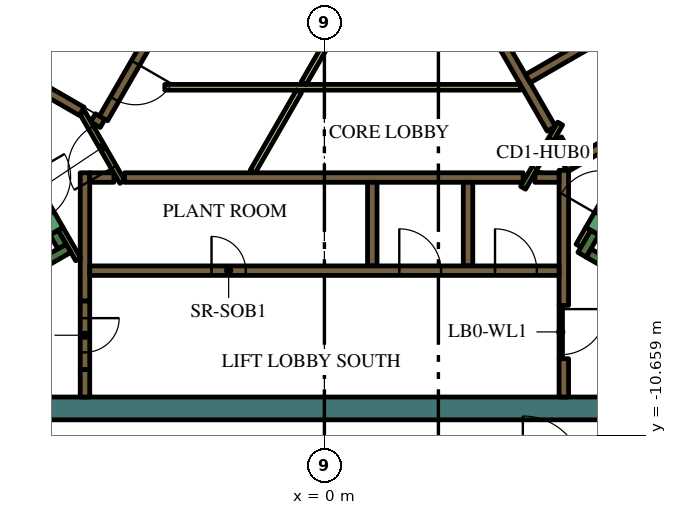
"""IFC4 building model, lengths in metres.
Left out: names, types, materials, properties, quantities, classifications, styles, units other than length and angle.
Written with IfcOpenShell. Run it as: python <this file> out.ifc"""

import sys

from ifc_helpers import new_model, si_unit, direction, frame, frame_2d, origin, place, context, subcontext, project, spatial, rectangle, extrude, element, fill, save


model = new_model("IFC4")
c1 = context("Model", 3, precision=1e-05, world=origin(), true_north=direction((0.0, 1.0)))
c2 = subcontext(c1, "Body", "Model", "MODEL_VIEW")
j1 = project(units=[si_unit("LENGTHUNIT", "METRE"), si_unit("PLANEANGLEUNIT", "RADIAN")], contexts=[c1])
p1 = place(None, origin())
s1 = spatial("IfcSite", under=j1, at=p1, CompositionType="ELEMENT")
p2 = place(p1, origin())
s2 = spatial("IfcBuilding", under=s1, at=p2, CompositionType="ELEMENT")
p3 = place(p2, frame((0.0, 0.0, 331.8)))
s3 = spatial("IfcBuildingStorey", under=s2, at=p3, CompositionType="ELEMENT", Elevation=331.8)
p4 = place(p3, frame((8.904, -9.95, 0.0), z_axis=(0.0, 0.0, 1.0), x_axis=(-1.0, 0.0, 0.0)))
e1 = element("IfcWall", 1, at=p4, inside=s3, PredefinedType="SOLIDWALL", context=c2, shape_type="SweptSolid", body=[
    extrude(rectangle(XDim=22.161, YDim=0.6, at=frame_2d((11.081, 0.0))), origin(), (0.0, 0.0, 1.0), 4.2),
])
p5 = place(p3, frame((-4.652, 11.842, 0.0), z_axis=(0.0, 0.0, 1.0), x_axis=(-0.500003640647, -0.866023301845, 0.0)))
e2 = element("IfcWall", 2, at=p5, inside=s3, PredefinedType="SOLIDWALL", context=c2, shape_type="SweptSolid", body=[
    extrude(rectangle(XDim=15.858, YDim=0.6, at=frame_2d((7.929, 0.0))), origin(), (0.0, 0.0, 1.0), 4.2),
])
p6 = place(p3, frame((12.84, -9.261, 0.0), z_axis=(0.0, 0.0, 1.0), x_axis=(-0.866013990052, 0.500019768644, 0.0)))
e3 = element("IfcWall", 3, at=p6, inside=s3, PredefinedType="SOLIDWALL", context=c2, shape_type="SweptSolid", body=[
    extrude(rectangle(XDim=6.8, YDim=0.25, at=frame_2d((3.4, 0.0))), origin(), (0.0, 0.0, 1.0), 4.2),
])
p7 = place(p3, frame((6.78, -5.906, 0.0), z_axis=(0.0, 0.0, 1.0), x_axis=(0.500223362819, 0.865896406789, 0.0)))
e4 = element("IfcWall", 4, at=p7, inside=s3, PredefinedType="SOLIDWALL", context=c2, shape_type="SweptSolid", body=[
    extrude(rectangle(XDim=0.675, YDim=0.25, at=frame_2d((0.337, 0.0))), origin(), (0.0, 0.0, 1.0), 4.2),
])
p8 = place(p3, frame((-12.84, -9.261, 0.0), z_axis=(0.0, 0.0, 1.0), x_axis=(0.866016039709, 0.500016218704, 0.0)))
e5 = element("IfcWall", 5, at=p8, inside=s3, PredefinedType="SOLIDWALL", context=c2, shape_type="SweptSolid", body=[
    extrude(rectangle(XDim=7.05, YDim=0.25, at=frame_2d((3.525, 0.0))), origin(), (0.0, 0.0, 1.0), 4.2),
])
p9 = place(p3, frame((-6.905, -5.69, 0.0), z_axis=(0.0, 0.0, 1.0), x_axis=(-0.500402024738, 0.865793170242, 0.0)))
e6 = element("IfcWall", 6, at=p9, inside=s3, PredefinedType="SOLIDWALL", context=c2, shape_type="SweptSolid", body=[
    extrude(rectangle(XDim=0.425, YDim=0.25, at=frame_2d((0.212, 0.0))), origin(), (0.0, 0.0, 1.0), 4.2),
])
p10 = place(p3, frame((6.3, -7.24, 0.0), z_axis=(0.0, 0.0, 1.0), x_axis=(0.0, 1.0, 0.0)))
e7 = element("IfcWall", 7, at=p10, inside=s3, PredefinedType="SOLIDWALL", context=c2, shape_type="SweptSolid", body=[
    extrude(rectangle(XDim=3.556, YDim=0.25, at=frame_2d((1.778, 0.0))), origin(), (0.0, 0.0, 1.0), 4.2),
])
p11 = place(p3, frame((6.3, -9.65, 0.0), z_axis=(0.0, 0.0, 1.0), x_axis=(0.0, 1.0, 0.0)))
e8 = element("IfcWall", 8, at=p11, inside=s3, PredefinedType="SOLIDWALL", context=c2, shape_type="SweptSolid", body=[
    extrude(rectangle(XDim=1.008, YDim=0.25, at=frame_2d((0.504, 0.0))), origin(), (0.0, 0.0, 1.0), 4.2),
])
p12 = place(p3, frame((5.538, -3.875, 0.0), z_axis=(0.0, 0.0, 1.0), x_axis=(1.0, 0.0, 0.0)))
e9 = element("IfcWall", 9, at=p12, inside=s3, PredefinedType="SOLIDWALL", context=c2, shape_type="SweptSolid", body=[
    extrude(rectangle(XDim=0.637, YDim=0.25, at=frame_2d((0.318, 0.0))), origin(), (0.0, 0.0, 1.0), 4.2),
])
p13 = place(p3, frame((-5.259, -3.875, 0.0), z_axis=(0.0, 0.0, 1.0), x_axis=(1.0, 0.0, 0.0)))
e10 = element("IfcWall", 10, at=p13, inside=s3, PredefinedType="SOLIDWALL", context=c2, shape_type="SweptSolid", body=[
    extrude(rectangle(XDim=10.489, YDim=0.25, at=frame_2d((5.244, 0.0))), origin(), (0.0, 0.0, 1.0), 4.2),
])
for number, where, z_axis, x_axis in (
    (11, (1.26, -4.0, 0.0), (0.0, 0.0, 1.0), (0.0, -1.0, 0.0)),
    (12, (3.78, -4.0, 0.0), (0.0, 0.0, 1.0), (0.0, -1.0, 0.0)),
):
    element("IfcWall", number, at=place(p3, frame(where, z_axis=z_axis, x_axis=x_axis)), inside=s3, PredefinedType="SOLIDWALL", context=c2, shape_type="SweptSolid", body=[
        extrude(rectangle(XDim=2.2, YDim=0.25, at=frame_2d((1.1, 0.0))), origin(), (0.0, 0.0, 1.0), 4.2),
    ])
p14 = place(p3, frame((-6.3, -7.125, 0.0), z_axis=(0.0, 0.0, 1.0), x_axis=(0.0, 1.0, 0.0)))
e13 = element("IfcWall", 13, at=p14, inside=s3, PredefinedType="SOLIDWALL", context=c2, shape_type="SweptSolid", body=[
    extrude(rectangle(XDim=3.375, YDim=0.25, at=frame_2d((1.687, 0.0))), origin(), (0.0, 0.0, 1.0), 4.2),
])
p15 = place(p3, frame((-6.175, -3.875, 0.0), z_axis=(0.0, 0.0, 1.0), x_axis=(1.0, 0.0, 0.0)))
e14 = element("IfcWall", 14, at=p15, inside=s3, PredefinedType="SOLIDWALL", context=c2, shape_type="SweptSolid", body=[
    extrude(rectangle(XDim=0.637, YDim=0.25, at=frame_2d((0.318, 0.0))), origin(), (0.0, 0.0, 1.0), 4.2),
])
p16 = place(p3, frame((-6.3, -8.925, 0.0), z_axis=(0.0, 0.0, 1.0), x_axis=(0.0, -1.0, 0.0)))
e15 = element("IfcWall", 15, at=p16, inside=s3, PredefinedType="SOLIDWALL", context=c2, shape_type="SweptSolid", body=[
    extrude(rectangle(XDim=0.725, YDim=0.25, at=frame_2d((0.363, 0.0))), origin(), (0.0, 0.0, 1.0), 4.2),
])
p17 = place(p3, frame((8.61, -2.303, 0.0), z_axis=(0.0, 0.0, 1.0), x_axis=(-0.866056864386, -0.49994550468, 0.0)))
e16 = element("IfcWall", 16, at=p17, inside=s3, PredefinedType="SOLIDWALL", context=c2, shape_type="SweptSolid", body=[
    extrude(rectangle(XDim=2.621, YDim=0.25, at=frame_2d((1.311, 0.0))), origin(), (0.0, 0.0, 1.0), 4.2),
])
p18 = place(p3, frame((6.13, -2.867, 0.0), z_axis=(0.0, 0.0, 1.0), x_axis=(0.500160776593, -0.865932559475, 0.0)))
e17 = element("IfcWall", 17, at=p18, inside=s3, PredefinedType="SOLIDWALL", context=c2, shape_type="SweptSolid", body=[
    extrude(rectangle(XDim=0.627, YDim=0.25, at=frame_2d((0.313, 0.0))), origin(), (0.0, 0.0, 1.0), 4.2),
])
p19 = place(p3, frame((5.97, -2.591, 0.0), z_axis=(0.0, 0.0, 1.0), x_axis=(-0.499994469932, 0.866028596547, 0.0)))
e18 = element("IfcWall", 18, at=p19, inside=s3, PredefinedType="SOLIDWALL", context=c2, shape_type="SweptSolid", body=[
    extrude(rectangle(XDim=10.488, YDim=0.25, at=frame_2d((5.244, 0.0))), origin(), (0.0, 0.0, 1.0), 4.2),
])
p20 = place(p3, frame((5.354, -1.274, 0.0), z_axis=(0.0, 0.0, 1.0), x_axis=(0.866008176907, 0.50002983664, 0.0)))
e19 = element("IfcWall", 19, at=p20, inside=s3, PredefinedType="SOLIDWALL", context=c2, shape_type="SweptSolid", body=[
    extrude(rectangle(XDim=2.2, YDim=0.25, at=frame_2d((1.1, 0.0))), origin(), (0.0, 0.0, 1.0), 4.2),
])
p21 = place(p3, frame((-8.06, -1.311, 0.0), z_axis=(0.0, 0.0, 1.0), x_axis=(0.50000273126, 0.866023826885, 0.0)))
e20 = element("IfcWall", 20, at=p21, inside=s3, PredefinedType="SOLIDWALL", context=c2, shape_type="SweptSolid", body=[
    extrude(rectangle(XDim=10.33, YDim=0.25, at=frame_2d((5.165, 0.0))), origin(), (0.0, 0.0, 1.0), 4.2),
])
p22 = place(p3, frame((-6.088, -2.305, 0.0), z_axis=(0.0, 0.0, 1.0), x_axis=(0.866059450854, -0.499941024108, 0.0)))
e21 = element("IfcWall", 21, at=p22, inside=s3, PredefinedType="SOLIDWALL", context=c2, shape_type="SweptSolid", body=[
    extrude(rectangle(XDim=0.29, YDim=0.25, at=frame_2d((0.145, 0.0))), origin(), (0.0, 0.0, 1.0), 4.2),
])
p23 = place(p3, frame((-7.889, -1.265, 0.0), z_axis=(0.0, 0.0, 1.0), x_axis=(0.865986741702, -0.500066958712, 0.0)))
e22 = element("IfcWall", 22, at=p23, inside=s3, PredefinedType="SOLIDWALL", context=c2, shape_type="SweptSolid", body=[
    extrude(rectangle(XDim=1.738, YDim=0.25, at=frame_2d((0.869, 0.0))), origin(), (0.0, 0.0, 1.0), 4.2),
])
p24 = place(p3, frame((-6.48, -6.027, 0.0), z_axis=(0.0, 0.0, 1.0), x_axis=(-0.499927229454, 0.866067413802, 0.0)))
e23 = element("IfcWall", 23, at=p24, inside=s3, PredefinedType="PARTITIONING", context=c2, shape_type="SweptSolid", body=[
    extrude(rectangle(XDim=0.929, YDim=0.15, at=frame_2d((0.464, 0.0))), origin(), (0.0, 0.0, 1.0), 4.2),
])
p25 = place(p3, frame((6.945, -5.222, 0.0), z_axis=(0.0, 0.0, 1.0), x_axis=(-0.499818422106, -0.866130212453, 0.0)))
e24 = element("IfcWall", 24, at=p25, inside=s3, PredefinedType="PARTITIONING", context=c2, shape_type="SweptSolid", body=[
    extrude(rectangle(XDim=0.514, YDim=0.15, at=frame_2d((0.257, 0.0))), origin(), (0.0, 0.0, 1.0), 3.45),
])
p26 = place(p3, frame((-4.2, -1.5, 0.0), z_axis=(0.0, 0.0, 1.0), x_axis=(1.0, 0.0, 0.0)))
e25 = element("IfcWall", 25, at=p26, inside=s3, PredefinedType="PARTITIONING", context=c2, shape_type="SweptSolid", body=[
    extrude(rectangle(XDim=9.359, YDim=0.15, at=frame_2d((4.68, 0.0))), origin(), (0.0, 0.0, 1.0), 3.45),
])
p27 = place(p3, frame((-0.544, -1.393, 0.0), z_axis=(0.0, 0.0, 1.0), x_axis=(0.499928740635, 0.866066541489, 0.0)))
e26 = element("IfcWall", 26, at=p27, inside=s3, PredefinedType="PARTITIONING", context=c2, shape_type="SweptSolid", body=[
    extrude(rectangle(XDim=1.912, YDim=0.15, at=frame_2d((0.956, 0.0))), origin(), (0.0, 0.0, 1.0), 3.45),
])
p28 = place(p3, frame((-0.668, -1.607, 0.0), z_axis=(0.0, 0.0, 1.0), x_axis=(-0.50003736129, -0.866003832159, 0.0)))
e27 = element("IfcWall", 27, at=p28, inside=s3, PredefinedType="PARTITIONING", context=c2, shape_type="SweptSolid", body=[
    extrude(rectangle(XDim=2.438, YDim=0.15, at=frame_2d((1.219, 0.0))), origin(), (0.0, 0.0, 1.0), 3.45),
])
p29 = place(p3, frame((-6.175, -6.325, 0.0), z_axis=(0.0, 0.0, 1.0), x_axis=(1.0, 0.0, 0.0)))
e28 = element("IfcWall", 28, at=p29, inside=s3, PredefinedType="SOLIDWALL", context=c2, shape_type="SweptSolid", body=[
    extrude(rectangle(XDim=12.35, YDim=0.25, at=frame_2d((6.175, 0.0))), origin(), (0.0, 0.0, 1.0), 4.2),
])
p30 = place(p29, frame((3.205, 0.0, 0.0)))
e29 = element("IfcOpeningElement", 29, at=p30, cuts=e28, PredefinedType="OPENING", context=c2, shape_type="SweptSolid", body=[
    extrude(rectangle(XDim=0.9, YDim=2.1, at=frame_2d((0.45, 1.05))), frame((0.0, 0.135, 0.0), z_axis=(0.0, -1.0, 0.0), x_axis=(1.0, 0.0, 0.0)), (0.0, 0.0, 1.0), 0.27),
])
p31 = place(p29, frame((8.145, 0.0, 0.0)))
e30 = element("IfcOpeningElement", 30, at=p31, cuts=e28, PredefinedType="OPENING", context=c2, shape_type="SweptSolid", body=[
    extrude(rectangle(XDim=1.1, YDim=2.1, at=frame_2d((0.55, 1.05))), frame((0.0, 0.135, 0.0), z_axis=(0.0, -1.0, 0.0), x_axis=(1.0, 0.0, 0.0)), (0.0, 0.0, 1.0), 0.27),
])
p32 = place(p29, frame((10.665, 0.0, 0.0)))
e31 = element("IfcOpeningElement", 31, at=p32, cuts=e28, PredefinedType="OPENING", context=c2, shape_type="SweptSolid", body=[
    extrude(rectangle(XDim=1.1, YDim=2.1, at=frame_2d((0.55, 1.05))), frame((0.0, 0.135, 0.0), z_axis=(0.0, -1.0, 0.0), x_axis=(1.0, 0.0, 0.0)), (0.0, 0.0, 1.0), 0.27),
])
p33 = place(p3, frame((8.565, -2.185, 0.0), z_axis=(0.0, 0.0, 1.0), x_axis=(-0.499997954832, 0.866026584559, 0.0)))
e32 = element("IfcWall", 32, at=p33, inside=s3, PredefinedType="SOLIDWALL", context=c2, shape_type="SweptSolid", body=[
    extrude(rectangle(XDim=12.35, YDim=0.25, at=frame_2d((6.175, 0.0))), origin(), (0.0, 0.0, 1.0), 4.2),
])
p34 = place(p33, frame((0.685, 0.0, 0.0)))
e33 = element("IfcOpeningElement", 33, at=p34, cuts=e32, PredefinedType="OPENING", context=c2, shape_type="SweptSolid", body=[
    extrude(rectangle(XDim=0.9, YDim=2.1, at=frame_2d((0.45, 1.05))), frame((0.0, 0.135, 0.0), z_axis=(0.0, -1.0, 0.0), x_axis=(1.0, 0.0, 0.0)), (0.0, 0.0, 1.0), 0.27),
])
p35 = place(p33, frame((3.105, 0.0, 0.0)))
e34 = element("IfcOpeningElement", 34, at=p35, cuts=e32, PredefinedType="OPENING", context=c2, shape_type="SweptSolid", body=[
    extrude(rectangle(XDim=1.1, YDim=2.1, at=frame_2d((0.55, 1.05))), frame((0.0, 0.135, 0.0), z_axis=(0.0, -1.0, 0.0), x_axis=(1.0, 0.0, 0.0)), (0.0, 0.0, 1.0), 0.27),
])
p36 = place(p33, frame((5.625, 0.0, 0.0)))
e35 = element("IfcOpeningElement", 35, at=p36, cuts=e32, PredefinedType="OPENING", context=c2, shape_type="SweptSolid", body=[
    extrude(rectangle(XDim=1.1, YDim=2.1, at=frame_2d((0.55, 1.05))), frame((0.0, 0.135, 0.0), z_axis=(0.0, -1.0, 0.0), x_axis=(1.0, 0.0, 0.0)), (0.0, 0.0, 1.0), 0.27),
])
p37 = place(p33, frame((8.145, 0.0, 0.0)))
e36 = element("IfcOpeningElement", 36, at=p37, cuts=e32, PredefinedType="OPENING", context=c2, shape_type="SweptSolid", body=[
    extrude(rectangle(XDim=1.1, YDim=2.1, at=frame_2d((0.55, 1.05))), frame((0.0, 0.135, 0.0), z_axis=(0.0, -1.0, 0.0), x_axis=(1.0, 0.0, 0.0)), (0.0, 0.0, 1.0), 0.27),
])
p38 = place(p33, frame((10.665, 0.0, 0.0)))
e37 = element("IfcOpeningElement", 37, at=p38, cuts=e32, PredefinedType="OPENING", context=c2, shape_type="SweptSolid", body=[
    extrude(rectangle(XDim=1.1, YDim=2.1, at=frame_2d((0.55, 1.05))), frame((0.0, 0.135, 0.0), z_axis=(0.0, -1.0, 0.0), x_axis=(1.0, 0.0, 0.0)), (0.0, 0.0, 1.0), 0.27),
])
p39 = place(p3, frame((-0.898, 6.194, 0.0), z_axis=(0.0, 0.0, 1.0), x_axis=(-0.499996202215, -0.866027596426, 0.0)))
e38 = element("IfcWall", 38, at=p39, inside=s3, PredefinedType="SOLIDWALL", context=c2, shape_type="SweptSolid", body=[
    extrude(rectangle(XDim=9.83, YDim=0.25, at=frame_2d((4.915, 0.0))), origin(), (0.0, 0.0, 1.0), 4.2),
])
p40 = place(p39, frame((0.585, 0.0, 0.0)))
e39 = element("IfcOpeningElement", 39, at=p40, cuts=e38, PredefinedType="OPENING", context=c2, shape_type="SweptSolid", body=[
    extrude(rectangle(XDim=1.1, YDim=2.1, at=frame_2d((0.55, 1.05))), frame((0.0, 0.135, 0.0), z_axis=(0.0, -1.0, 0.0), x_axis=(1.0, 0.0, 0.0)), (0.0, 0.0, 1.0), 0.27),
])
p41 = place(p39, frame((3.105, 0.0, 0.0)))
e40 = element("IfcOpeningElement", 40, at=p41, cuts=e38, PredefinedType="OPENING", context=c2, shape_type="SweptSolid", body=[
    extrude(rectangle(XDim=1.1, YDim=2.1, at=frame_2d((0.55, 1.05))), frame((0.0, 0.135, 0.0), z_axis=(0.0, -1.0, 0.0), x_axis=(1.0, 0.0, 0.0)), (0.0, 0.0, 1.0), 0.27),
])
p42 = place(p39, frame((5.625, 0.0, 0.0)))
e41 = element("IfcOpeningElement", 41, at=p42, cuts=e38, PredefinedType="OPENING", context=c2, shape_type="SweptSolid", body=[
    extrude(rectangle(XDim=1.1, YDim=2.1, at=frame_2d((0.55, 1.05))), frame((0.0, 0.135, 0.0), z_axis=(0.0, -1.0, 0.0), x_axis=(1.0, 0.0, 0.0)), (0.0, 0.0, 1.0), 0.27),
])
p43 = place(p39, frame((8.145, 0.0, 0.0)))
e42 = element("IfcOpeningElement", 42, at=p43, cuts=e38, PredefinedType="OPENING", context=c2, shape_type="SweptSolid", body=[
    extrude(rectangle(XDim=1.1, YDim=2.1, at=frame_2d((0.55, 1.05))), frame((0.0, 0.135, 0.0), z_axis=(0.0, -1.0, 0.0), x_axis=(1.0, 0.0, 0.0)), (0.0, 0.0, 1.0), 0.27),
])
p44 = place(p3, frame((7.053, -5.284, 0.0), z_axis=(0.0, 0.0, 1.0), x_axis=(0.500078061341, 0.865980330357, 0.0)))
e43 = element("IfcWall", 43, at=p44, inside=s3, PredefinedType="SOLIDWALL", context=c2, shape_type="SweptSolid", body=[
    extrude(rectangle(XDim=2.1, YDim=0.4, at=frame_2d((1.05, 0.0))), origin(), (0.0, 0.0, 1.0), 4.2),
])
p45 = place(p44, frame((0.45, 0.0, 0.0)))
e44 = element("IfcOpeningElement", 44, at=p45, cuts=e43, PredefinedType="OPENING", context=c2, shape_type="SweptSolid", body=[
    extrude(rectangle(XDim=1.2, YDim=2.1, at=frame_2d((0.6, 1.05))), frame((0.0, 0.21, 0.0), z_axis=(0.0, -1.0, 0.0), x_axis=(1.0, 0.0, 0.0)), (0.0, 0.0, 1.0), 0.42),
])
p46 = place(p3, frame((-8.103, -3.466, 0.0), z_axis=(0.0, 0.0, 1.0), x_axis=(0.500078061341, -0.865980330357, 0.0)))
e45 = element("IfcWall", 45, at=p46, inside=s3, PredefinedType="SOLIDWALL", context=c2, shape_type="SweptSolid", body=[
    extrude(rectangle(XDim=2.1, YDim=0.4, at=frame_2d((1.05, 0.0))), origin(), (0.0, 0.0, 1.0), 4.2),
])
p47 = place(p46, frame((0.45, 0.0, 0.0)))
e46 = element("IfcOpeningElement", 46, at=p47, cuts=e45, PredefinedType="OPENING", context=c2, shape_type="SweptSolid", body=[
    extrude(rectangle(XDim=1.2, YDim=2.1, at=frame_2d((0.6, 1.05))), frame((0.0, 0.21, 0.0), z_axis=(0.0, -1.0, 0.0), x_axis=(1.0, 0.0, 0.0)), (0.0, 0.0, 1.0), 0.42),
])
p48 = place(p3, frame((-6.3, -7.125, 0.0), z_axis=(0.0, 0.0, 1.0), x_axis=(0.0, -1.0, 0.0)))
e47 = element("IfcWall", 47, at=p48, inside=s3, PredefinedType="SOLIDWALL", context=c2, shape_type="SweptSolid", body=[
    extrude(rectangle(XDim=1.8, YDim=0.25, at=frame_2d((0.9, 0.0))), origin(), (0.0, 0.0, 1.0), 4.2),
])
p49 = place(p48, frame((0.45, 0.0, 0.0)))
e48 = element("IfcOpeningElement", 48, at=p49, cuts=e47, PredefinedType="OPENING", context=c2, shape_type="SweptSolid", body=[
    extrude(rectangle(XDim=0.9, YDim=2.1, at=frame_2d((0.45, 1.05))), frame((0.0, 0.135, 0.0), z_axis=(0.0, -1.0, 0.0), x_axis=(1.0, 0.0, 0.0)), (0.0, 0.0, 1.0), 0.27),
])
p50 = place(p3, frame((6.203, -2.456, 0.0), z_axis=(0.0, 0.0, 1.0), x_axis=(-0.500043961785, -0.866000020948, 0.0)))
e49 = element("IfcWall", 49, at=p50, inside=s3, PredefinedType="PARTITIONING", context=c2, shape_type="SweptSolid", body=[
    extrude(rectangle(XDim=1.95, YDim=0.15, at=frame_2d((0.975, 0.0))), origin(), (0.0, 0.0, 1.0), 4.2),
])
p51 = place(p50, frame((0.45, 0.0, 0.0)))
e50 = element("IfcOpeningElement", 50, at=p51, cuts=e49, PredefinedType="OPENING", context=c2, shape_type="SweptSolid", body=[
    extrude(rectangle(XDim=0.9, YDim=2.1, at=frame_2d((0.45, 1.05))), frame((0.0, 0.085, 0.0), z_axis=(0.0, -1.0, 0.0), x_axis=(1.0, 0.0, 0.0)), (0.0, 0.0, 1.0), 0.17),
])
p52 = place(p3, frame((-5.317, -3.99, 0.0), z_axis=(0.0, 0.0, 1.0), x_axis=(-0.500027713859, 0.866009402589, 0.0)))
e51 = element("IfcWall", 51, at=p52, inside=s3, PredefinedType="PARTITIONING", context=c2, shape_type="SweptSolid", body=[
    extrude(rectangle(XDim=2.1, YDim=0.15, at=frame_2d((1.05, 0.0))), origin(), (0.0, 0.0, 1.0), 4.2),
])
p53 = place(p52, frame((0.45, 0.0, 0.0)))
e52 = element("IfcOpeningElement", 52, at=p53, cuts=e51, PredefinedType="OPENING", context=c2, shape_type="SweptSolid", body=[
    extrude(rectangle(XDim=1.2, YDim=2.1, at=frame_2d((0.6, 1.05))), frame((0.0, 0.085, 0.0), z_axis=(0.0, -1.0, 0.0), x_axis=(1.0, 0.0, 0.0)), (0.0, 0.0, 1.0), 0.17),
])
p54 = place(p3, frame((6.22, -7.237, 0.0), z_axis=(0.0, 0.0, 1.0), x_axis=(0.0, -1.0, 0.0)))
e53 = element("IfcWall", 53, at=p54, inside=s3, PredefinedType="PARTITIONING", context=c2, shape_type="SweptSolid", body=[
    extrude(rectangle(XDim=1.4, YDim=0.09, at=frame_2d((0.7, 0.0))), origin(), (0.0, 0.0, 1.0), 3.45),
])
p55 = place(p54, frame((0.1, 0.0, 0.0)))
e54 = element("IfcOpeningElement", 54, at=p55, cuts=e53, PredefinedType="OPENING", context=c2, shape_type="SweptSolid", body=[
    extrude(rectangle(XDim=1.2, YDim=2.1, at=frame_2d((0.6, 1.05))), frame((0.0, 0.055, 0.0), z_axis=(0.0, -1.0, 0.0), x_axis=(1.0, 0.0, 0.0)), (0.0, 0.0, 1.0), 0.11),
])
p56 = place(p30, origin())
e55 = element("IfcDoor", 55, at=p56, inside=s3, OperationType="SINGLE_SWING_LEFT", PredefinedType="DOOR", context=c2, shape_type="SweptSolid", body=[
    extrude(rectangle(XDim=0.9, YDim=2.1, at=frame_2d((0.45, 1.05))), frame((0.0, 0.025, 0.0), z_axis=(0.0, -1.0, 0.0), x_axis=(1.0, 0.0, 0.0)), (0.0, 0.0, 1.0), 0.05),
])
fill(e29, e55)
p57 = place(p31, origin())
e56 = element("IfcDoor", 56, at=p57, inside=s3, OperationType="DOUBLE_DOOR_SLIDING", PredefinedType="DOOR", context=c2, shape_type="SweptSolid", body=[
    extrude(rectangle(XDim=1.1, YDim=2.1, at=frame_2d((0.55, 1.05))), frame((0.0, 0.025, 0.0), z_axis=(0.0, -1.0, 0.0), x_axis=(1.0, 0.0, 0.0)), (0.0, 0.0, 1.0), 0.05),
])
fill(e30, e56)
p58 = place(p32, origin())
e57 = element("IfcDoor", 57, at=p58, inside=s3, OperationType="DOUBLE_DOOR_SLIDING", PredefinedType="DOOR", context=c2, shape_type="SweptSolid", body=[
    extrude(rectangle(XDim=1.1, YDim=2.1, at=frame_2d((0.55, 1.05))), frame((0.0, 0.025, 0.0), z_axis=(0.0, -1.0, 0.0), x_axis=(1.0, 0.0, 0.0)), (0.0, 0.0, 1.0), 0.05),
])
fill(e31, e57)
p59 = place(p43, origin())
e58 = element("IfcDoor", 58, at=p59, inside=s3, OperationType="DOUBLE_DOOR_SLIDING", PredefinedType="DOOR", context=c2, shape_type="SweptSolid", body=[
    extrude(rectangle(XDim=1.1, YDim=2.1, at=frame_2d((0.55, 1.05))), frame((0.0, 0.025, 0.0), z_axis=(0.0, -1.0, 0.0), x_axis=(1.0, 0.0, 0.0)), (0.0, 0.0, 1.0), 0.05),
])
fill(e42, e58)
p60 = place(p49, origin())
e59 = element("IfcDoor", 59, at=p60, inside=s3, OperationType="SINGLE_SWING_LEFT", PredefinedType="DOOR", context=c2, shape_type="SweptSolid", body=[
    extrude(rectangle(XDim=0.9, YDim=2.1, at=frame_2d((0.45, 1.05))), frame((0.0, 0.025, 0.0), z_axis=(0.0, -1.0, 0.0), x_axis=(1.0, 0.0, 0.0)), (0.0, 0.0, 1.0), 0.05),
])
fill(e48, e59)
p61 = place(p51, origin())
e60 = element("IfcDoor", 60, at=p61, inside=s3, OperationType="SINGLE_SWING_LEFT", PredefinedType="DOOR", context=c2, shape_type="SweptSolid", body=[
    extrude(rectangle(XDim=0.9, YDim=2.1, at=frame_2d((0.45, 1.05))), frame((0.0, 0.025, 0.0), z_axis=(0.0, -1.0, 0.0), x_axis=(1.0, 0.0, 0.0)), (0.0, 0.0, 1.0), 0.05),
])
fill(e50, e60)
p62 = place(p53, origin())
e61 = element("IfcDoor", 61, at=p62, inside=s3, OperationType="SINGLE_SWING_LEFT", PredefinedType="DOOR", context=c2, shape_type="SweptSolid", body=[
    extrude(rectangle(XDim=1.2, YDim=2.1, at=frame_2d((0.6, 1.05))), frame((0.0, 0.025, 0.0), z_axis=(0.0, -1.0, 0.0), x_axis=(1.0, 0.0, 0.0)), (0.0, 0.0, 1.0), 0.05),
])
fill(e52, e61)
p63 = place(p55, origin())
e62 = element("IfcDoor", 62, at=p63, inside=s3, OperationType="SINGLE_SWING_LEFT", PredefinedType="DOOR", context=c2, shape_type="SweptSolid", body=[
    extrude(rectangle(XDim=1.2, YDim=2.1, at=frame_2d((0.6, 1.05))), frame((0.0, 0.025, 0.0), z_axis=(0.0, -1.0, 0.0), x_axis=(1.0, 0.0, 0.0)), (0.0, 0.0, 1.0), 0.05),
])
fill(e54, e62)
save(model, sys.argv[1])
